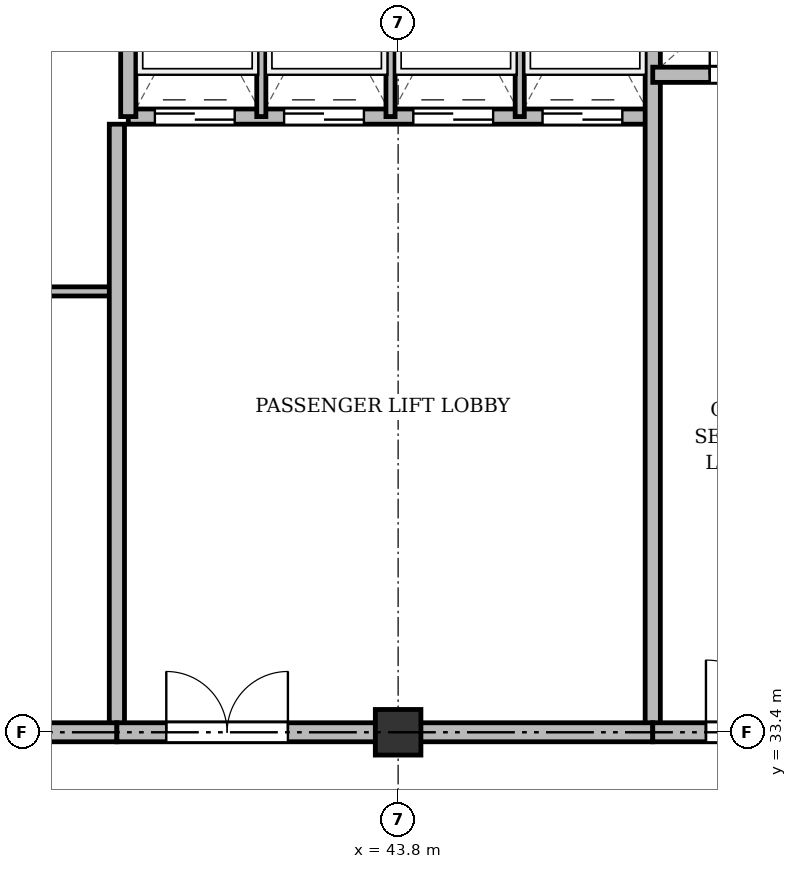
"""IFC4 building model, lengths in metres.
Left out: names, types, materials, properties, quantities, classifications, styles, units other than length and angle.
Written with IfcOpenShell. Run it as: python <this file> out.ifc"""

import sys

from ifc_helpers import new_model, si_unit, direction, frame, frame_2d, origin, origin_2d, place, context, subcontext, project, spatial, rectangle, extrude, source, transform, mapped, element, fill, save


model = new_model("IFC4")
c1 = context("Model", 3, precision=1e-05, world=origin(), true_north=direction((0.0, 1.0)))
c2 = subcontext(c1, "Body", "Model", "MODEL_VIEW")
j1 = project(units=[si_unit("LENGTHUNIT", "METRE"), si_unit("PLANEANGLEUNIT", "RADIAN")], contexts=[c1])
p1 = place(None, origin())
s1 = spatial("IfcSite", under=j1, at=p1, CompositionType="ELEMENT")
p2 = place(p1, origin())
s2 = spatial("IfcBuilding", under=s1, at=p2, CompositionType="ELEMENT")
p3 = place(p2, frame((0.0, 0.0, 295.5)))
s3 = spatial("IfcBuildingStorey", under=s2, at=p3, CompositionType="ELEMENT", Elevation=295.5)
m1 = source(origin(), c2, "Body", "SweptSolid", [
    extrude(rectangle(XDim=0.6, YDim=0.6, at=origin_2d()), origin(), (0.0, 0.0, 1.0), 3.6),
])
p4 = place(p3, frame((43.8, 33.4, 0.0), z_axis=(0.0, 0.0, 1.0), x_axis=(1.0, 0.0, 0.0)))
e1 = element("IfcColumn", 1, at=p4, inside=s3, PredefinedType="COLUMN", context=c2, shape_type="MappedRepresentation", body=[
    mapped(m1, transform((0.0, 0.0, 0.0), x_axis=(1.0, 0.0, 0.0), y_axis=(0.0, 1.0, 0.0), z_axis=(0.0, 0.0, 1.0), scale=1.0)),
])
p5 = place(p3, frame((33.3, 39.2, 0.0), z_axis=(0.0, 0.0, 1.0), x_axis=(1.0, 0.0, 0.0)))
e2 = element("IfcWall", 2, at=p5, inside=s3, PredefinedType="PARTITIONING", context=c2, shape_type="SweptSolid", body=[
    extrude(rectangle(XDim=6.8, YDim=0.12, at=frame_2d((3.4, 0.0))), origin(), (0.0, 0.0, 1.0), 3.26),
])
p6 = place(p5, frame((2.6, 0.0, 0.0)))
e3 = element("IfcOpeningElement", 3, at=p6, cuts=e2, PredefinedType="OPENING", context=c2, shape_type="SweptSolid", body=[
    extrude(rectangle(XDim=0.95, YDim=2.15, at=frame_2d((0.475, 1.075))), frame((0.0, 0.07, 0.0), z_axis=(0.0, -1.0, 0.0), x_axis=(1.0, 0.0, 0.0)), (0.0, 0.0, 1.0), 0.14),
])
p7 = place(p3, frame((40.1, 33.4, 0.0), z_axis=(0.0, 0.0, 1.0), x_axis=(0.0, 1.0, 0.0)))
e4 = element("IfcWall", 4, at=p7, inside=s3, PredefinedType="SOLIDWALL", context=c2, shape_type="SweptSolid", body=[
    extrude(rectangle(XDim=8.0, YDim=0.2, at=frame_2d((4.0, 0.0))), origin(), (0.0, 0.0, 1.0), 2.81),
])
p8 = place(p3, frame((40.25, 41.5, 0.0), z_axis=(0.0, 0.0, 1.0), x_axis=(1.0, 0.0, 0.0)))
e5 = element("IfcWall", 5, at=p8, inside=s3, PredefinedType="SOLIDWALL", context=c2, shape_type="SweptSolid", body=[
    extrude(rectangle(XDim=6.9, YDim=0.2, at=frame_2d((3.45, 0.0))), origin(), (0.0, 0.0, 1.0), 3.26),
])
p9 = place(p8, frame((0.35, 0.0, 0.0)))
e6 = element("IfcOpeningElement", 6, at=p9, cuts=e5, PredefinedType="OPENING", context=c2, shape_type="SweptSolid", body=[
    extrude(rectangle(XDim=1.05, YDim=2.15, at=frame_2d((0.525, 1.075))), frame((0.0, 0.11, 0.0), z_axis=(0.0, -1.0, 0.0), x_axis=(1.0, 0.0, 0.0)), (0.0, 0.0, 1.0), 0.22),
])
p10 = place(p8, frame((2.05, 0.0, 0.0)))
e7 = element("IfcOpeningElement", 7, at=p10, cuts=e5, PredefinedType="OPENING", context=c2, shape_type="SweptSolid", body=[
    extrude(rectangle(XDim=1.05, YDim=2.15, at=frame_2d((0.525, 1.075))), frame((0.0, 0.11, 0.0), z_axis=(0.0, -1.0, 0.0), x_axis=(1.0, 0.0, 0.0)), (0.0, 0.0, 1.0), 0.22),
])
p11 = place(p8, frame((3.75, 0.0, 0.0)))
e8 = element("IfcOpeningElement", 8, at=p11, cuts=e5, PredefinedType="OPENING", context=c2, shape_type="SweptSolid", body=[
    extrude(rectangle(XDim=1.05, YDim=2.15, at=frame_2d((0.525, 1.075))), frame((0.0, 0.11, 0.0), z_axis=(0.0, -1.0, 0.0), x_axis=(1.0, 0.0, 0.0)), (0.0, 0.0, 1.0), 0.22),
])
p12 = place(p8, frame((5.45, 0.0, 0.0)))
e9 = element("IfcOpeningElement", 9, at=p12, cuts=e5, PredefinedType="OPENING", context=c2, shape_type="SweptSolid", body=[
    extrude(rectangle(XDim=1.05, YDim=2.15, at=frame_2d((0.525, 1.075))), frame((0.0, 0.11, 0.0), z_axis=(0.0, -1.0, 0.0), x_axis=(1.0, 0.0, 0.0)), (0.0, 0.0, 1.0), 0.22),
])
p13 = place(p3, frame((40.25, 41.5, 0.0), z_axis=(0.0, 0.0, 1.0), x_axis=(0.0, 1.0, 0.0)))
e10 = element("IfcWall", 10, at=p13, inside=s3, PredefinedType="SOLIDWALL", context=c2, shape_type="SweptSolid", body=[
    extrude(rectangle(XDim=3.2, YDim=0.2, at=frame_2d((1.6, 0.0))), origin(), (0.0, 0.0, 1.0), 3.26),
])
for number, where, z_axis, x_axis in (
    (11, (42.0, 41.5, 0.0), (0.0, 0.0, 1.0), (0.0, 1.0, 0.0)),
    (12, (43.7, 41.5, 0.0), (0.0, 0.0, 1.0), (0.0, 1.0, 0.0)),
    (13, (45.4, 41.5, 0.0), (0.0, 0.0, 1.0), (0.0, 1.0, 0.0)),
):
    element("IfcWall", number, at=place(p3, frame(where, z_axis=z_axis, x_axis=x_axis)), inside=s3, PredefinedType="PARTITIONING", context=c2, shape_type="SweptSolid", body=[
        extrude(rectangle(XDim=3.2, YDim=0.12, at=frame_2d((1.6, 0.0))), origin(), (0.0, 0.0, 1.0), 3.26),
    ])
p14 = place(p3, frame((47.15, 33.4, 0.0), z_axis=(0.0, 0.0, 1.0), x_axis=(0.0, 1.0, 0.0)))
e14 = element("IfcWall", 14, at=p14, inside=s3, PredefinedType="SOLIDWALL", context=c2, shape_type="SweptSolid", body=[
    extrude(rectangle(XDim=11.3, YDim=0.2, at=frame_2d((5.65, 0.0))), origin(), (0.0, 0.0, 1.0), 2.81),
])
p15 = place(p3, frame((33.3, 33.4, 0.0), z_axis=(0.0, 0.0, 1.0), x_axis=(1.0, 0.0, 0.0)))
e15 = element("IfcWall", 15, at=p15, inside=s3, PredefinedType="PARTITIONING", context=c2, shape_type="SweptSolid", body=[
    extrude(rectangle(XDim=6.8, YDim=0.25, at=frame_2d((3.4, 0.0))), origin(), (0.0, 0.0, 1.0), 2.81),
])
p16 = place(p15, frame((2.4, 0.0, 0.0)))
e16 = element("IfcOpeningElement", 16, at=p16, cuts=e15, PredefinedType="OPENING", context=c2, shape_type="SweptSolid", body=[
    extrude(rectangle(XDim=1.0, YDim=2.15, at=frame_2d((0.5, 1.075))), frame((0.0, 0.135, 0.0), z_axis=(0.0, -1.0, 0.0), x_axis=(1.0, 0.0, 0.0)), (0.0, 0.0, 1.0), 0.27),
])
p17 = place(p3, frame((40.1, 33.4, 0.0), z_axis=(0.0, 0.0, 1.0), x_axis=(1.0, 0.0, 0.0)))
e17 = element("IfcWall", 17, at=p17, inside=s3, PredefinedType="PARTITIONING", context=c2, shape_type="SweptSolid", body=[
    extrude(rectangle(XDim=7.05, YDim=0.25, at=frame_2d((3.525, 0.0))), origin(), (0.0, 0.0, 1.0), 2.81),
])
p18 = place(p17, frame((0.65, 0.0, 0.0)))
e18 = element("IfcOpeningElement", 18, at=p18, cuts=e17, PredefinedType="OPENING", context=c2, shape_type="SweptSolid", body=[
    extrude(rectangle(XDim=1.6, YDim=2.2, at=frame_2d((0.8, 1.1))), frame((0.0, 0.135, 0.0), z_axis=(0.0, -1.0, 0.0), x_axis=(1.0, 0.0, 0.0)), (0.0, 0.0, 1.0), 0.27),
])
p19 = place(p3, frame((47.15, 42.05, 0.0), z_axis=(0.0, 0.0, 1.0), x_axis=(1.0, 0.0, 0.0)))
e19 = element("IfcWall", 19, at=p19, inside=s3, PredefinedType="SOLIDWALL", context=c2, shape_type="SweptSolid", body=[
    extrude(rectangle(XDim=7.85, YDim=0.2, at=frame_2d((3.925, 0.0))), origin(), (0.0, 0.0, 1.0), 2.76),
])
p20 = place(p19, frame((0.75, 0.0, 0.0)))
e20 = element("IfcOpeningElement", 20, at=p20, cuts=e19, PredefinedType="OPENING", context=c2, shape_type="SweptSolid", body=[
    extrude(rectangle(XDim=0.9, YDim=2.1, at=frame_2d((0.45, 1.05))), frame((0.0, 0.11, 0.0), z_axis=(0.0, -1.0, 0.0), x_axis=(1.0, 0.0, 0.0)), (0.0, 0.0, 1.0), 0.22),
])
p21 = place(p19, frame((3.85, 0.0, 0.0)))
e21 = element("IfcOpeningElement", 21, at=p21, cuts=e19, PredefinedType="OPENING", context=c2, shape_type="SweptSolid", body=[
    extrude(rectangle(XDim=0.9, YDim=2.1, at=frame_2d((0.45, 1.05))), frame((0.0, 0.11, 0.0), z_axis=(0.0, -1.0, 0.0), x_axis=(1.0, 0.0, 0.0)), (0.0, 0.0, 1.0), 0.22),
])
p22 = place(p3, frame((47.15, 33.4, 0.0), z_axis=(0.0, 0.0, 1.0), x_axis=(1.0, 0.0, 0.0)))
e22 = element("IfcWall", 22, at=p22, inside=s3, PredefinedType="PARTITIONING", context=c2, shape_type="SweptSolid", body=[
    extrude(rectangle(XDim=11.15, YDim=0.25, at=frame_2d((5.575, 0.0))), origin(), (0.0, 0.0, 1.0), 2.81),
])
p23 = place(p22, frame((0.7, 0.0, 0.0)))
e23 = element("IfcOpeningElement", 23, at=p23, cuts=e22, PredefinedType="OPENING", context=c2, shape_type="SweptSolid", body=[
    extrude(rectangle(XDim=0.95, YDim=2.15, at=frame_2d((0.475, 1.075))), frame((0.0, 0.135, 0.0), z_axis=(0.0, -1.0, 0.0), x_axis=(1.0, 0.0, 0.0)), (0.0, 0.0, 1.0), 0.27),
])
p24 = place(p22, frame((6.0, 0.0, 0.0)))
e24 = element("IfcOpeningElement", 24, at=p24, cuts=e22, PredefinedType="OPENING", context=c2, shape_type="SweptSolid", body=[
    extrude(rectangle(XDim=1.2, YDim=2.15, at=frame_2d((0.6, 1.075))), frame((0.0, 0.135, 0.0), z_axis=(0.0, -1.0, 0.0), x_axis=(1.0, 0.0, 0.0)), (0.0, 0.0, 1.0), 0.27),
])
m2 = source(origin(), c2, "Body", "SweptSolid", [
    extrude(rectangle(XDim=1.05, YDim=2.15, at=frame_2d((0.525, 1.075))), frame((0.0, 0.025, 0.0), z_axis=(0.0, -1.0, 0.0), x_axis=(1.0, 0.0, 0.0)), (0.0, 0.0, 1.0), 0.05),
])
p25 = place(p9, origin())
e25 = element("IfcDoor", 25, at=p25, inside=s3, OperationType="DOUBLE_DOOR_SLIDING", PredefinedType="DOOR", context=c2, shape_type="MappedRepresentation", body=[
    mapped(m2, transform((0.0, 0.0, 0.0), x_axis=(1.0, 0.0, 0.0), y_axis=(0.0, 1.0, 0.0), z_axis=(0.0, 0.0, 1.0), scale=1.0)),
])
fill(e6, e25)
p26 = place(p10, origin())
e26 = element("IfcDoor", 26, at=p26, inside=s3, OperationType="DOUBLE_DOOR_SLIDING", PredefinedType="DOOR", context=c2, shape_type="MappedRepresentation", body=[
    mapped(m2, transform((0.0, 0.0, 0.0), x_axis=(1.0, 0.0, 0.0), y_axis=(0.0, 1.0, 0.0), z_axis=(0.0, 0.0, 1.0), scale=1.0)),
])
fill(e7, e26)
p27 = place(p11, origin())
e27 = element("IfcDoor", 27, at=p27, inside=s3, OperationType="DOUBLE_DOOR_SLIDING", PredefinedType="DOOR", context=c2, shape_type="MappedRepresentation", body=[
    mapped(m2, transform((0.0, 0.0, 0.0), x_axis=(1.0, 0.0, 0.0), y_axis=(0.0, 1.0, 0.0), z_axis=(0.0, 0.0, 1.0), scale=1.0)),
])
fill(e8, e27)
p28 = place(p12, origin())
e28 = element("IfcDoor", 28, at=p28, inside=s3, OperationType="DOUBLE_DOOR_SLIDING", PredefinedType="DOOR", context=c2, shape_type="MappedRepresentation", body=[
    mapped(m2, transform((0.0, 0.0, 0.0), x_axis=(1.0, 0.0, 0.0), y_axis=(0.0, 1.0, 0.0), z_axis=(0.0, 0.0, 1.0), scale=1.0)),
])
fill(e9, e28)
m3 = source(origin(), c2, "Body", "SweptSolid", [
    extrude(rectangle(XDim=1.6, YDim=2.2, at=frame_2d((0.8, 1.1))), frame((0.0, 0.025, 0.0), z_axis=(0.0, -1.0, 0.0), x_axis=(1.0, 0.0, 0.0)), (0.0, 0.0, 1.0), 0.05),
])
p29 = place(p18, origin())
e29 = element("IfcDoor", 29, at=p29, inside=s3, OperationType="DOUBLE_DOOR_SINGLE_SWING", PredefinedType="DOOR", context=c2, shape_type="MappedRepresentation", body=[
    mapped(m3, transform((0.0, 0.0, 0.0), x_axis=(1.0, 0.0, 0.0), y_axis=(0.0, 1.0, 0.0), z_axis=(0.0, 0.0, 1.0), scale=1.0)),
])
fill(e18, e29)
m4 = source(origin(), c2, "Body", "SweptSolid", [
    extrude(rectangle(XDim=0.9, YDim=2.1, at=frame_2d((0.45, 1.05))), frame((0.0, 0.025, 0.0), z_axis=(0.0, -1.0, 0.0), x_axis=(1.0, 0.0, 0.0)), (0.0, 0.0, 1.0), 0.05),
])
p30 = place(p20, origin())
e30 = element("IfcDoor", 30, at=p30, inside=s3, OperationType="SINGLE_SWING_LEFT", PredefinedType="DOOR", context=c2, shape_type="MappedRepresentation", body=[
    mapped(m4, transform((0.0, 0.0, 0.0), x_axis=(1.0, 0.0, 0.0), y_axis=(0.0, 1.0, 0.0), z_axis=(0.0, 0.0, 1.0), scale=1.0)),
])
fill(e20, e30)
m5 = source(origin(), c2, "Body", "SweptSolid", [
    extrude(rectangle(XDim=0.95, YDim=2.15, at=frame_2d((0.475, 1.075))), frame((0.0, 0.025, 0.0), z_axis=(0.0, -1.0, 0.0), x_axis=(1.0, 0.0, 0.0)), (0.0, 0.0, 1.0), 0.05),
])
p31 = place(p23, origin())
e31 = element("IfcDoor", 31, at=p31, inside=s3, OperationType="SINGLE_SWING_LEFT", PredefinedType="DOOR", context=c2, shape_type="MappedRepresentation", body=[
    mapped(m5, transform((0.0, 0.0, 0.0), x_axis=(1.0, 0.0, 0.0), y_axis=(0.0, 1.0, 0.0), z_axis=(0.0, 0.0, 1.0), scale=1.0)),
])
fill(e23, e31)
save(model, sys.argv[1])
